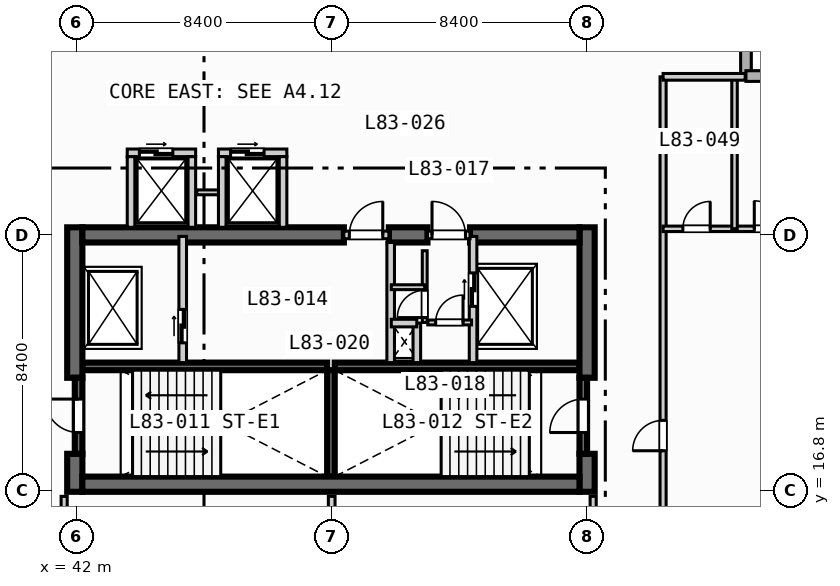
"""IFC4 building model, lengths in metres.
Left out: names, types, materials, properties, quantities, classifications, styles, units other than length and angle.
Written with IfcOpenShell. Run it as: python <this file> out.ifc"""

import sys

from ifc_helpers import new_model, si_unit, direction, frame, frame_2d, origin, place, context, subcontext, project, spatial, rectangle, extrude, element, fill, save


model = new_model("IFC4")
c1 = context("Model", 3, precision=1e-05, world=origin(), true_north=direction((0.0, 1.0)))
c2 = subcontext(c1, "Body", "Model", "MODEL_VIEW")
j1 = project(units=[si_unit("LENGTHUNIT", "METRE"), si_unit("PLANEANGLEUNIT", "RADIAN")], contexts=[c1])
p1 = place(None, origin())
s1 = spatial("IfcSite", under=j1, at=p1, CompositionType="ELEMENT")
p2 = place(p1, origin())
s2 = spatial("IfcBuilding", under=s1, at=p2, CompositionType="ELEMENT")
p3 = place(p2, frame((0.0, 0.0, 335.9)))
s3 = spatial("IfcBuildingStorey", under=s2, at=p3, CompositionType="ELEMENT", Elevation=335.9)
for number, where, z_axis, x_axis in (
    (1, (42.2, 20.875, 0.0), (0.0, 0.0, 1.0), (1.0, 0.0, 0.0)),
    (2, (50.5, 20.875, 0.0), (0.0, 0.0, 1.0), (1.0, 0.0, 0.0)),
):
    element("IfcWall", number, at=place(p3, frame(where, z_axis=z_axis, x_axis=x_axis)), inside=s3, PredefinedType="SOLIDWALL", context=c2, shape_type="SweptSolid", body=[
        extrude(rectangle(XDim=8.05, YDim=0.25, at=frame_2d((4.025, 0.0))), origin(), (0.0, 0.0, 1.0), 3.67),
    ])
p4 = place(p3, frame((50.375, 17.25, 0.0), z_axis=(0.0, 0.0, 1.0), x_axis=(0.0, 1.0, 0.0)))
e3 = element("IfcWall", 3, at=p4, inside=s3, PredefinedType="SOLIDWALL", context=c2, shape_type="SweptSolid", body=[
    extrude(rectangle(XDim=3.5, YDim=0.25, at=frame_2d((1.75, 0.0))), origin(), (0.0, 0.0, 1.0), 3.67),
])
p5 = place(p3, frame((41.95, 16.75, 0.0), z_axis=(0.0, 0.0, 1.0), x_axis=(0.0, 1.0, 0.0)))
e4 = element("IfcWall", 4, at=p5, inside=s3, PredefinedType="SHEAR", context=c2, shape_type="SweptSolid", body=[
    extrude(rectangle(XDim=1.25, YDim=0.5, at=frame_2d((0.625, 0.0))), origin(), (0.0, 0.0, 1.0), 3.67),
])
p6 = place(p3, frame((41.95, 20.5, 0.0), z_axis=(0.0, 0.0, 1.0), x_axis=(0.0, 1.0, 0.0)))
e5 = element("IfcWall", 5, at=p6, inside=s3, PredefinedType="SHEAR", context=c2, shape_type="SweptSolid", body=[
    extrude(rectangle(XDim=4.95, YDim=0.5, at=frame_2d((2.475, 0.0))), origin(), (0.0, 0.0, 1.0), 3.67),
])
p7 = place(p3, frame((58.8, 16.75, 0.0), z_axis=(0.0, 0.0, 1.0), x_axis=(0.0, 1.0, 0.0)))
e6 = element("IfcWall", 6, at=p7, inside=s3, PredefinedType="SHEAR", context=c2, shape_type="SweptSolid", body=[
    extrude(rectangle(XDim=1.25, YDim=0.5, at=frame_2d((0.625, 0.0))), origin(), (0.0, 0.0, 1.0), 3.67),
])
p8 = place(p3, frame((58.8, 20.5, 0.0), z_axis=(0.0, 0.0, 1.0), x_axis=(0.0, 1.0, 0.0)))
e7 = element("IfcWall", 7, at=p8, inside=s3, PredefinedType="SHEAR", context=c2, shape_type="SweptSolid", body=[
    extrude(rectangle(XDim=4.95, YDim=0.5, at=frame_2d((2.475, 0.0))), origin(), (0.0, 0.0, 1.0), 3.67),
])
p9 = place(p3, frame((42.2, 17.0, 0.0), z_axis=(0.0, 0.0, 1.0), x_axis=(1.0, 0.0, 0.0)))
e8 = element("IfcWall", 8, at=p9, inside=s3, PredefinedType="SHEAR", context=c2, shape_type="SweptSolid", body=[
    extrude(rectangle(XDim=16.35, YDim=0.5, at=frame_2d((8.175, 0.0))), origin(), (0.0, 0.0, 1.0), 3.67),
])
p10 = place(p3, frame((42.2, 25.2, 0.0), z_axis=(0.0, 0.0, 1.0), x_axis=(1.0, 0.0, 0.0)))
e9 = element("IfcWall", 9, at=p10, inside=s3, PredefinedType="SHEAR", context=c2, shape_type="SweptSolid", body=[
    extrude(rectangle(XDim=8.6, YDim=0.5, at=frame_2d((4.3, 0.0))), origin(), (0.0, 0.0, 1.0), 3.67),
])
p11 = place(p3, frame((52.28, 25.2, 0.0), z_axis=(0.0, 0.0, 1.0), x_axis=(1.0, 0.0, 0.0)))
e10 = element("IfcWall", 10, at=p11, inside=s3, PredefinedType="SHEAR", context=c2, shape_type="SweptSolid", body=[
    extrude(rectangle(XDim=1.27, YDim=0.5, at=frame_2d((0.635, 0.0))), origin(), (0.0, 0.0, 1.0), 3.67),
])
p12 = place(p3, frame((54.95, 25.2, 0.0), z_axis=(0.0, 0.0, 1.0), x_axis=(1.0, 0.0, 0.0)))
e11 = element("IfcWall", 11, at=p12, inside=s3, PredefinedType="SHEAR", context=c2, shape_type="SweptSolid", body=[
    extrude(rectangle(XDim=3.6, YDim=0.5, at=frame_2d((1.8, 0.0))), origin(), (0.0, 0.0, 1.0), 3.67),
])
for number, where, z_axis, x_axis in (
    (12, (64.025, 33.425, 0.0), (0.0, 0.0, 1.0), (0.0, -1.0, 0.0)),
    (13, (64.025, 30.425, 0.0), (0.0, 0.0, 1.0), (1.0, 0.0, 0.0)),
):
    element("IfcWall", number, at=place(p3, frame(where, z_axis=z_axis, x_axis=x_axis)), inside=s3, PredefinedType="STANDARD", context=c2, shape_type="SweptSolid", body=[
        extrude(rectangle(XDim=3.0, YDim=0.35, at=frame_2d((1.5, 0.0))), origin(), (0.0, 0.0, 1.0), 3.67),
    ])
p13 = place(p3, frame((42.075, 18.0, 0.0), z_axis=(0.0, 0.0, 1.0), x_axis=(0.0, 1.0, 0.0)))
e14 = element("IfcWall", 14, at=p13, inside=s3, PredefinedType="SOLIDWALL", context=c2, shape_type="SweptSolid", body=[
    extrude(rectangle(XDim=2.5, YDim=0.25, at=frame_2d((1.25, 0.0))), origin(), (0.0, 0.0, 1.0), 3.67),
])
p14 = place(p13, frame((0.7, 0.0, 0.0)))
e15 = element("IfcOpeningElement", 15, at=p14, cuts=e14, PredefinedType="OPENING", context=c2, shape_type="SweptSolid", body=[
    extrude(rectangle(XDim=1.1, YDim=2.15, at=frame_2d((0.55, 1.075))), frame((0.0, 0.135, 0.0), z_axis=(0.0, -1.0, 0.0), x_axis=(1.0, 0.0, 0.0)), (0.0, 0.0, 1.0), 0.27),
])
p15 = place(p3, frame((58.675, 18.0, 0.0), z_axis=(0.0, 0.0, 1.0), x_axis=(0.0, 1.0, 0.0)))
e16 = element("IfcWall", 16, at=p15, inside=s3, PredefinedType="SOLIDWALL", context=c2, shape_type="SweptSolid", body=[
    extrude(rectangle(XDim=2.5, YDim=0.25, at=frame_2d((1.25, 0.0))), origin(), (0.0, 0.0, 1.0), 3.67),
])
p16 = place(p15, frame((0.7, 0.0, 0.0)))
e17 = element("IfcOpeningElement", 17, at=p16, cuts=e16, PredefinedType="OPENING", context=c2, shape_type="SweptSolid", body=[
    extrude(rectangle(XDim=1.1, YDim=2.15, at=frame_2d((0.55, 1.075))), frame((0.0, 0.135, 0.0), z_axis=(0.0, -1.0, 0.0), x_axis=(1.0, 0.0, 0.0)), (0.0, 0.0, 1.0), 0.27),
])
p17 = place(p3, frame((45.5, 21.0, 0.0), z_axis=(0.0, 0.0, 1.0), x_axis=(0.0, 1.0, 0.0)))
e18 = element("IfcWall", 18, at=p17, inside=s3, PredefinedType="SOLIDWALL", context=c2, shape_type="SweptSolid", body=[
    extrude(rectangle(XDim=4.15, YDim=0.25, at=frame_2d((2.075, 0.0))), origin(), (0.0, 0.0, 1.0), 3.67),
])
p18 = place(p17, frame((0.65, 0.0, 0.0)))
e19 = element("IfcOpeningElement", 19, at=p18, cuts=e18, PredefinedType="OPENING", context=c2, shape_type="SweptSolid", body=[
    extrude(rectangle(XDim=1.1, YDim=2.15, at=frame_2d((0.55, 1.075))), frame((0.0, 0.135, 0.0), z_axis=(0.0, -1.0, 0.0), x_axis=(1.0, 0.0, 0.0)), (0.0, 0.0, 1.0), 0.27),
])
p19 = place(p3, frame((50.8, 25.2, 0.0), z_axis=(0.0, 0.0, 1.0), x_axis=(1.0, 0.0, 0.0)))
e20 = element("IfcWall", 20, at=p19, inside=s3, PredefinedType="SOLIDWALL", context=c2, shape_type="SweptSolid", body=[
    extrude(rectangle(XDim=1.48, YDim=0.25, at=frame_2d((0.74, 0.0))), origin(), (0.0, 0.0, 1.0), 3.67),
])
p20 = place(p19, frame((0.18, 0.0, 0.0)))
e21 = element("IfcOpeningElement", 21, at=p20, cuts=e20, PredefinedType="OPENING", context=c2, shape_type="SweptSolid", body=[
    extrude(rectangle(XDim=1.1, YDim=2.15, at=frame_2d((0.55, 1.075))), frame((0.0, 0.135, 0.0), z_axis=(0.0, -1.0, 0.0), x_axis=(1.0, 0.0, 0.0)), (0.0, 0.0, 1.0), 0.27),
])
p21 = place(p3, frame((52.34, 21.0, 0.0), z_axis=(0.0, 0.0, 1.0), x_axis=(0.0, 1.0, 0.0)))
e22 = element("IfcWall", 22, at=p21, inside=s3, PredefinedType="SOLIDWALL", context=c2, shape_type="SweptSolid", body=[
    extrude(rectangle(XDim=3.95, YDim=0.25, at=frame_2d((1.975, 0.0))), origin(), (0.0, 0.0, 1.0), 3.67),
])
p22 = place(p3, frame((55.05, 21.0, 0.0), z_axis=(0.0, 0.0, 1.0), x_axis=(0.0, 1.0, 0.0)))
e23 = element("IfcWall", 23, at=p22, inside=s3, PredefinedType="SOLIDWALL", context=c2, shape_type="SweptSolid", body=[
    extrude(rectangle(XDim=4.15, YDim=0.25, at=frame_2d((2.075, 0.0))), origin(), (0.0, 0.0, 1.0), 3.67),
])
p23 = place(p22, frame((1.85, 0.0, 0.0)))
e24 = element("IfcOpeningElement", 24, at=p23, cuts=e23, PredefinedType="OPENING", context=c2, shape_type="SweptSolid", body=[
    extrude(rectangle(XDim=1.1, YDim=2.15, at=frame_2d((0.55, 1.075))), frame((0.0, 0.135, 0.0), z_axis=(0.0, -1.0, 0.0), x_axis=(1.0, 0.0, 0.0)), (0.0, 0.0, 1.0), 0.27),
])
p24 = place(p3, frame((53.55, 25.2, 0.0), z_axis=(0.0, 0.0, 1.0), x_axis=(1.0, 0.0, 0.0)))
e25 = element("IfcWall", 25, at=p24, inside=s3, PredefinedType="SOLIDWALL", context=c2, shape_type="SweptSolid", body=[
    extrude(rectangle(XDim=1.4, YDim=0.25, at=frame_2d((0.7, 0.0))), origin(), (0.0, 0.0, 1.0), 3.67),
])
p25 = place(p24, frame((0.15, 0.0, 0.0)))
e26 = element("IfcOpeningElement", 26, at=p25, cuts=e25, PredefinedType="OPENING", context=c2, shape_type="SweptSolid", body=[
    extrude(rectangle(XDim=1.1, YDim=2.15, at=frame_2d((0.55, 1.075))), frame((0.0, 0.135, 0.0), z_axis=(0.0, -1.0, 0.0), x_axis=(1.0, 0.0, 0.0)), (0.0, 0.0, 1.0), 0.27),
])
p26 = place(p3, frame((53.2, 21.0, 0.0), z_axis=(0.0, 0.0, 1.0), x_axis=(0.0, 1.0, 0.0)))
e27 = element("IfcWall", 27, at=p26, inside=s3, PredefinedType="SOLIDWALL", context=c2, shape_type="SweptSolid", body=[
    extrude(rectangle(XDim=1.3, YDim=0.25, at=frame_2d((0.65, 0.0))), origin(), (0.0, 0.0, 1.0), 3.67),
])
p27 = place(p3, frame((52.36, 22.3, 0.0), z_axis=(0.0, 0.0, 1.0), x_axis=(1.0, 0.0, 0.0)))
e28 = element("IfcWall", 28, at=p27, inside=s3, PredefinedType="SOLIDWALL", context=c2, shape_type="SweptSolid", body=[
    extrude(rectangle(XDim=0.84, YDim=0.25, at=frame_2d((0.42, 0.0))), origin(), (0.0, 0.0, 1.0), 3.67),
])
p28 = place(p3, frame((53.56, 22.32, 0.0), z_axis=(0.0, 0.0, 1.0), x_axis=(1.0, 0.0, 0.0)))
e29 = element("IfcWall", 29, at=p28, inside=s3, PredefinedType="PARTITIONING", context=c2, shape_type="SweptSolid", body=[
    extrude(rectangle(XDim=1.44, YDim=0.16, at=frame_2d((0.72, 0.0))), origin(), (0.0, 0.0, 1.0), 3.67),
])
p29 = place(p28, frame((0.26, 0.0, 0.0)))
e30 = element("IfcOpeningElement", 30, at=p29, cuts=e29, PredefinedType="OPENING", context=c2, shape_type="SweptSolid", body=[
    extrude(rectangle(XDim=0.9, YDim=2.1, at=frame_2d((0.45, 1.05))), frame((0.0, 0.09, 0.0), z_axis=(0.0, -1.0, 0.0), x_axis=(1.0, 0.0, 0.0)), (0.0, 0.0, 1.0), 0.18),
])
p30 = place(p3, frame((53.46, 22.32, 0.0), z_axis=(0.0, 0.0, 1.0), x_axis=(0.0, 1.0, 0.0)))
e31 = element("IfcWall", 31, at=p30, inside=s3, PredefinedType="PARTITIONING", context=c2, shape_type="SweptSolid", body=[
    extrude(rectangle(XDim=2.36, YDim=0.16, at=frame_2d((1.18, 0.0))), origin(), (0.0, 0.0, 1.0), 3.67),
])
p31 = place(p30, frame((0.16, 0.0, 0.0)))
e32 = element("IfcOpeningElement", 32, at=p31, cuts=e31, PredefinedType="OPENING", context=c2, shape_type="SweptSolid", body=[
    extrude(rectangle(XDim=0.9, YDim=2.1, at=frame_2d((0.45, 1.05))), frame((0.0, 0.09, 0.0), z_axis=(0.0, -1.0, 0.0), x_axis=(1.0, 0.0, 0.0)), (0.0, 0.0, 1.0), 0.18),
])
p32 = place(p3, frame((52.36, 23.48, 0.0), z_axis=(0.0, 0.0, 1.0), x_axis=(1.0, 0.0, 0.0)))
e33 = element("IfcWall", 33, at=p32, inside=s3, PredefinedType="PARTITIONING", context=c2, shape_type="SweptSolid", body=[
    extrude(rectangle(XDim=1.1, YDim=0.16, at=frame_2d((0.55, 0.0))), origin(), (0.0, 0.0, 1.0), 3.67),
])
p33 = place(p3, frame((43.675, 27.9, 0.0), z_axis=(0.0, 0.0, 1.0), x_axis=(1.0, 0.0, 0.0)))
e34 = element("IfcWall", 34, at=p33, inside=s3, PredefinedType="SOLIDWALL", context=c2, shape_type="SweptSolid", body=[
    extrude(rectangle(XDim=2.25, YDim=0.25, at=frame_2d((1.125, 0.0))), origin(), (0.0, 0.0, 1.0), 3.67),
])
p34 = place(p33, frame((0.4, 0.0, 0.0)))
e35 = element("IfcOpeningElement", 35, at=p34, cuts=e34, PredefinedType="OPENING", context=c2, shape_type="SweptSolid", body=[
    extrude(rectangle(XDim=1.1, YDim=2.15, at=frame_2d((0.55, 1.075))), frame((0.0, 0.135, 0.0), z_axis=(0.0, -1.0, 0.0), x_axis=(1.0, 0.0, 0.0)), (0.0, 0.0, 1.0), 0.27),
])
for number, where, z_axis, x_axis in (
    (36, (43.8, 25.45, 0.0), (0.0, 0.0, 1.0), (0.0, 1.0, 0.0)),
    (37, (45.8, 25.45, 0.0), (0.0, 0.0, 1.0), (0.0, 1.0, 0.0)),
):
    element("IfcWall", number, at=place(p3, frame(where, z_axis=z_axis, x_axis=x_axis)), inside=s3, PredefinedType="SOLIDWALL", context=c2, shape_type="SweptSolid", body=[
        extrude(rectangle(XDim=2.325, YDim=0.25, at=frame_2d((1.163, 0.0))), origin(), (0.0, 0.0, 1.0), 3.67),
    ])
p35 = place(p3, frame((45.96, 26.6, 0.0), z_axis=(0.0, 0.0, 1.0), x_axis=(1.0, 0.0, 0.0)))
e38 = element("IfcWall", 38, at=p35, inside=s3, PredefinedType="PARTITIONING", context=c2, shape_type="SweptSolid", body=[
    extrude(rectangle(XDim=0.88, YDim=0.16, at=frame_2d((0.44, 0.0))), origin(), (0.0, 0.0, 1.0), 3.67),
])
p36 = place(p3, frame((46.675, 27.9, 0.0), z_axis=(0.0, 0.0, 1.0), x_axis=(1.0, 0.0, 0.0)))
e39 = element("IfcWall", 39, at=p36, inside=s3, PredefinedType="SOLIDWALL", context=c2, shape_type="SweptSolid", body=[
    extrude(rectangle(XDim=2.25, YDim=0.25, at=frame_2d((1.125, 0.0))), origin(), (0.0, 0.0, 1.0), 3.67),
])
p37 = place(p36, frame((0.4, 0.0, 0.0)))
e40 = element("IfcOpeningElement", 40, at=p37, cuts=e39, PredefinedType="OPENING", context=c2, shape_type="SweptSolid", body=[
    extrude(rectangle(XDim=1.1, YDim=2.15, at=frame_2d((0.55, 1.075))), frame((0.0, 0.135, 0.0), z_axis=(0.0, -1.0, 0.0), x_axis=(1.0, 0.0, 0.0)), (0.0, 0.0, 1.0), 0.27),
])
for number, where, z_axis, x_axis in (
    (41, (46.8, 25.45, 0.0), (0.0, 0.0, 1.0), (0.0, 1.0, 0.0)),
    (42, (48.8, 25.45, 0.0), (0.0, 0.0, 1.0), (0.0, 1.0, 0.0)),
):
    element("IfcWall", number, at=place(p3, frame(where, z_axis=z_axis, x_axis=x_axis)), inside=s3, PredefinedType="SOLIDWALL", context=c2, shape_type="SweptSolid", body=[
        extrude(rectangle(XDim=2.325, YDim=0.25, at=frame_2d((1.163, 0.0))), origin(), (0.0, 0.0, 1.0), 3.67),
    ])
p38 = place(p3, frame((41.6, 8.65, 0.0), z_axis=(0.0, 0.0, 1.0), x_axis=(0.0, 1.0, 0.0)))
e43 = element("IfcWall", 43, at=p38, inside=s3, PredefinedType="PARTITIONING", context=c2, shape_type="SweptSolid", body=[
    extrude(rectangle(XDim=7.95, YDim=0.2, at=frame_2d((3.975, 0.0))), origin(), (0.0, 0.0, 1.0), 3.67),
])
p39 = place(p38, frame((2.2, 0.0, 0.0)))
e44 = element("IfcOpeningElement", 44, at=p39, cuts=e43, PredefinedType="OPENING", context=c2, shape_type="SweptSolid", body=[
    extrude(rectangle(XDim=0.92, YDim=2.1, at=frame_2d((0.46, 1.05))), frame((0.0, 0.11, 0.0), z_axis=(0.0, -1.0, 0.0), x_axis=(1.0, 0.0, 0.0)), (0.0, 0.0, 1.0), 0.22),
])
p40 = place(p3, frame((59.0, 8.65, 0.0), z_axis=(0.0, 0.0, 1.0), x_axis=(0.0, 1.0, 0.0)))
e45 = element("IfcWall", 45, at=p40, inside=s3, PredefinedType="PARTITIONING", context=c2, shape_type="SweptSolid", body=[
    extrude(rectangle(XDim=7.95, YDim=0.2, at=frame_2d((3.975, 0.0))), origin(), (0.0, 0.0, 1.0), 3.07),
])
p41 = place(p40, frame((2.2, 0.0, 0.0)))
e46 = element("IfcOpeningElement", 46, at=p41, cuts=e45, PredefinedType="OPENING", context=c2, shape_type="SweptSolid", body=[
    extrude(rectangle(XDim=0.92, YDim=2.1, at=frame_2d((0.46, 1.05))), frame((0.0, 0.11, 0.0), z_axis=(0.0, -1.0, 0.0), x_axis=(1.0, 0.0, 0.0)), (0.0, 0.0, 1.0), 0.22),
])
p42 = place(p3, frame((50.4, 8.65, 0.0), z_axis=(0.0, 0.0, 1.0), x_axis=(0.0, 1.0, 0.0)))
e47 = element("IfcWall", 47, at=p42, inside=s3, PredefinedType="PARTITIONING", context=c2, shape_type="SweptSolid", body=[
    extrude(rectangle(XDim=7.95, YDim=0.22, at=frame_2d((3.975, 0.0))), origin(), (0.0, 0.0, 1.0), 3.207),
])
p43 = place(p3, frame((61.3, 11.6, 0.0), z_axis=(0.0, 0.0, 1.0), x_axis=(0.0, 1.0, 0.0)))
e48 = element("IfcWall", 48, at=p43, inside=s3, PredefinedType="PARTITIONING", context=c2, shape_type="SweptSolid", body=[
    extrude(rectangle(XDim=18.8, YDim=0.2, at=frame_2d((9.4, 0.0))), origin(), (0.0, 0.0, 1.0), 3.67),
])
p44 = place(p43, frame((6.5, 0.0, 0.0)))
e49 = element("IfcOpeningElement", 49, at=p44, cuts=e48, PredefinedType="OPENING", context=c2, shape_type="SweptSolid", body=[
    extrude(rectangle(XDim=1.0, YDim=2.15, at=frame_2d((0.5, 1.075))), frame((0.0, 0.11, 0.0), z_axis=(0.0, -1.0, 0.0), x_axis=(1.0, 0.0, 0.0)), (0.0, 0.0, 1.0), 0.22),
])
p45 = place(p3, frame((61.3, 25.4, 0.0), z_axis=(0.0, 0.0, 1.0), x_axis=(1.0, 0.0, 0.0)))
e50 = element("IfcWall", 50, at=p45, inside=s3, PredefinedType="PLUMBINGWALL", context=c2, shape_type="SweptSolid", body=[
    extrude(rectangle(XDim=5.5, YDim=0.18, at=frame_2d((2.75, 0.0))), origin(), (0.0, 0.0, 1.0), 3.207),
])
p46 = place(p45, frame((0.65, 0.0, 0.0)))
e51 = element("IfcOpeningElement", 51, at=p46, cuts=e50, PredefinedType="OPENING", context=c2, shape_type="SweptSolid", body=[
    extrude(rectangle(XDim=0.9, YDim=2.1, at=frame_2d((0.45, 1.05))), frame((0.0, 0.1, 0.0), z_axis=(0.0, -1.0, 0.0), x_axis=(1.0, 0.0, 0.0)), (0.0, 0.0, 1.0), 0.2),
])
p47 = place(p45, frame((3.0, 0.0, 0.0)))
e52 = element("IfcOpeningElement", 52, at=p47, cuts=e50, PredefinedType="OPENING", context=c2, shape_type="SweptSolid", body=[
    extrude(rectangle(XDim=0.92, YDim=2.1, at=frame_2d((0.46, 1.05))), frame((0.0, 0.1, 0.0), z_axis=(0.0, -1.0, 0.0), x_axis=(1.0, 0.0, 0.0)), (0.0, 0.0, 1.0), 0.2),
])
p48 = place(p3, frame((63.65, 25.4, 0.0), z_axis=(0.0, 0.0, 1.0), x_axis=(0.0, 1.0, 0.0)))
e53 = element("IfcWall", 53, at=p48, inside=s3, PredefinedType="PLUMBINGWALL", context=c2, shape_type="SweptSolid", body=[
    extrude(rectangle(XDim=5.0, YDim=0.18, at=frame_2d((2.5, 0.0))), origin(), (0.0, 0.0, 1.0), 3.67),
])
p49 = place(p3, frame((61.3, 30.4, 0.0), z_axis=(0.0, 0.0, 1.0), x_axis=(1.0, 0.0, 0.0)))
e54 = element("IfcWall", 54, at=p49, inside=s3, PredefinedType="PARTITIONING", context=c2, shape_type="SweptSolid", body=[
    extrude(rectangle(XDim=2.7, YDim=0.22, at=frame_2d((1.35, 0.0))), origin(), (0.0, 0.0, 1.0), 3.67),
])
p50 = place(p14, origin())
e55 = element("IfcDoor", 55, at=p50, inside=s3, OperationType="SINGLE_SWING_RIGHT", PredefinedType="DOOR", context=c2, shape_type="SweptSolid", body=[
    extrude(rectangle(XDim=1.1, YDim=2.15, at=frame_2d((0.55, 1.075))), frame((0.0, 0.025, 0.0), z_axis=(0.0, -1.0, 0.0), x_axis=(1.0, 0.0, 0.0)), (0.0, 0.0, 1.0), 0.05),
])
fill(e15, e55)
p51 = place(p16, origin())
e56 = element("IfcDoor", 56, at=p51, inside=s3, OperationType="SINGLE_SWING_LEFT", PredefinedType="DOOR", context=c2, shape_type="SweptSolid", body=[
    extrude(rectangle(XDim=1.1, YDim=2.15, at=frame_2d((0.55, 1.075))), frame((0.0, 0.025, 0.0), z_axis=(0.0, -1.0, 0.0), x_axis=(1.0, 0.0, 0.0)), (0.0, 0.0, 1.0), 0.05),
])
fill(e17, e56)
p52 = place(p18, origin())
e57 = element("IfcDoor", 57, at=p52, inside=s3, OperationType="SLIDING_TO_LEFT", PredefinedType="DOOR", context=c2, shape_type="SweptSolid", body=[
    extrude(rectangle(XDim=1.1, YDim=2.15, at=frame_2d((0.55, 1.075))), frame((0.0, 0.025, 0.0), z_axis=(0.0, -1.0, 0.0), x_axis=(1.0, 0.0, 0.0)), (0.0, 0.0, 1.0), 0.05),
])
fill(e19, e57)
p53 = place(p20, origin())
e58 = element("IfcDoor", 58, at=p53, inside=s3, OperationType="SINGLE_SWING_RIGHT", PredefinedType="DOOR", context=c2, shape_type="SweptSolid", body=[
    extrude(rectangle(XDim=1.1, YDim=2.15, at=frame_2d((0.55, 1.075))), frame((0.0, 0.025, 0.0), z_axis=(0.0, -1.0, 0.0), x_axis=(1.0, 0.0, 0.0)), (0.0, 0.0, 1.0), 0.05),
])
fill(e21, e58)
p54 = place(p23, origin())
e59 = element("IfcDoor", 59, at=p54, inside=s3, OperationType="SLIDING_TO_LEFT", PredefinedType="DOOR", context=c2, shape_type="SweptSolid", body=[
    extrude(rectangle(XDim=1.1, YDim=2.15, at=frame_2d((0.55, 1.075))), frame((0.0, 0.025, 0.0), z_axis=(0.0, -1.0, 0.0), x_axis=(1.0, 0.0, 0.0)), (0.0, 0.0, 1.0), 0.05),
])
fill(e24, e59)
p55 = place(p25, origin())
e60 = element("IfcDoor", 60, at=p55, inside=s3, OperationType="SINGLE_SWING_LEFT", PredefinedType="DOOR", context=c2, shape_type="SweptSolid", body=[
    extrude(rectangle(XDim=1.1, YDim=2.15, at=frame_2d((0.55, 1.075))), frame((0.0, 0.025, 0.0), z_axis=(0.0, -1.0, 0.0), x_axis=(1.0, 0.0, 0.0)), (0.0, 0.0, 1.0), 0.05),
])
fill(e26, e60)
p56 = place(p29, origin())
e61 = element("IfcDoor", 61, at=p56, inside=s3, OperationType="SINGLE_SWING_RIGHT", PredefinedType="DOOR", context=c2, shape_type="SweptSolid", body=[
    extrude(rectangle(XDim=0.9, YDim=2.1, at=frame_2d((0.45, 1.05))), frame((0.0, 0.025, 0.0), z_axis=(0.0, -1.0, 0.0), x_axis=(1.0, 0.0, 0.0)), (0.0, 0.0, 1.0), 0.05),
])
fill(e30, e61)
p57 = place(p31, origin())
e62 = element("IfcDoor", 62, at=p57, inside=s3, OperationType="SINGLE_SWING_LEFT", PredefinedType="DOOR", context=c2, shape_type="SweptSolid", body=[
    extrude(rectangle(XDim=0.9, YDim=2.1, at=frame_2d((0.45, 1.05))), frame((0.0, 0.025, 0.0), z_axis=(0.0, -1.0, 0.0), x_axis=(1.0, 0.0, 0.0)), (0.0, 0.0, 1.0), 0.05),
])
fill(e32, e62)
p58 = place(p34, origin())
e63 = element("IfcDoor", 63, at=p58, inside=s3, OperationType="SLIDING_TO_LEFT", PredefinedType="DOOR", context=c2, shape_type="SweptSolid", body=[
    extrude(rectangle(XDim=1.1, YDim=2.15, at=frame_2d((0.55, 1.075))), frame((0.0, 0.025, 0.0), z_axis=(0.0, -1.0, 0.0), x_axis=(1.0, 0.0, 0.0)), (0.0, 0.0, 1.0), 0.05),
])
fill(e35, e63)
p59 = place(p37, origin())
e64 = element("IfcDoor", 64, at=p59, inside=s3, OperationType="SLIDING_TO_LEFT", PredefinedType="DOOR", context=c2, shape_type="SweptSolid", body=[
    extrude(rectangle(XDim=1.1, YDim=2.15, at=frame_2d((0.55, 1.075))), frame((0.0, 0.025, 0.0), z_axis=(0.0, -1.0, 0.0), x_axis=(1.0, 0.0, 0.0)), (0.0, 0.0, 1.0), 0.05),
])
fill(e40, e64)
p60 = place(p44, origin())
e65 = element("IfcDoor", 65, at=p60, inside=s3, OperationType="SINGLE_SWING_LEFT", PredefinedType="DOOR", context=c2, shape_type="SweptSolid", body=[
    extrude(rectangle(XDim=1.0, YDim=2.15, at=frame_2d((0.5, 1.075))), frame((0.0, 0.025, 0.0), z_axis=(0.0, -1.0, 0.0), x_axis=(1.0, 0.0, 0.0)), (0.0, 0.0, 1.0), 0.05),
])
fill(e49, e65)
p61 = place(p46, origin())
e66 = element("IfcDoor", 66, at=p61, inside=s3, OperationType="SINGLE_SWING_RIGHT", PredefinedType="DOOR", context=c2, shape_type="SweptSolid", body=[
    extrude(rectangle(XDim=0.9, YDim=2.1, at=frame_2d((0.45, 1.05))), frame((0.0, 0.025, 0.0), z_axis=(0.0, -1.0, 0.0), x_axis=(1.0, 0.0, 0.0)), (0.0, 0.0, 1.0), 0.05),
])
fill(e51, e66)
p62 = place(p47, origin())
e67 = element("IfcDoor", 67, at=p62, inside=s3, OperationType="SINGLE_SWING_LEFT", PredefinedType="DOOR", context=c2, shape_type="SweptSolid", body=[
    extrude(rectangle(XDim=0.92, YDim=2.1, at=frame_2d((0.46, 1.05))), frame((0.0, 0.025, 0.0), z_axis=(0.0, -1.0, 0.0), x_axis=(1.0, 0.0, 0.0)), (0.0, 0.0, 1.0), 0.05),
])
fill(e52, e67)
save(model, sys.argv[1])
